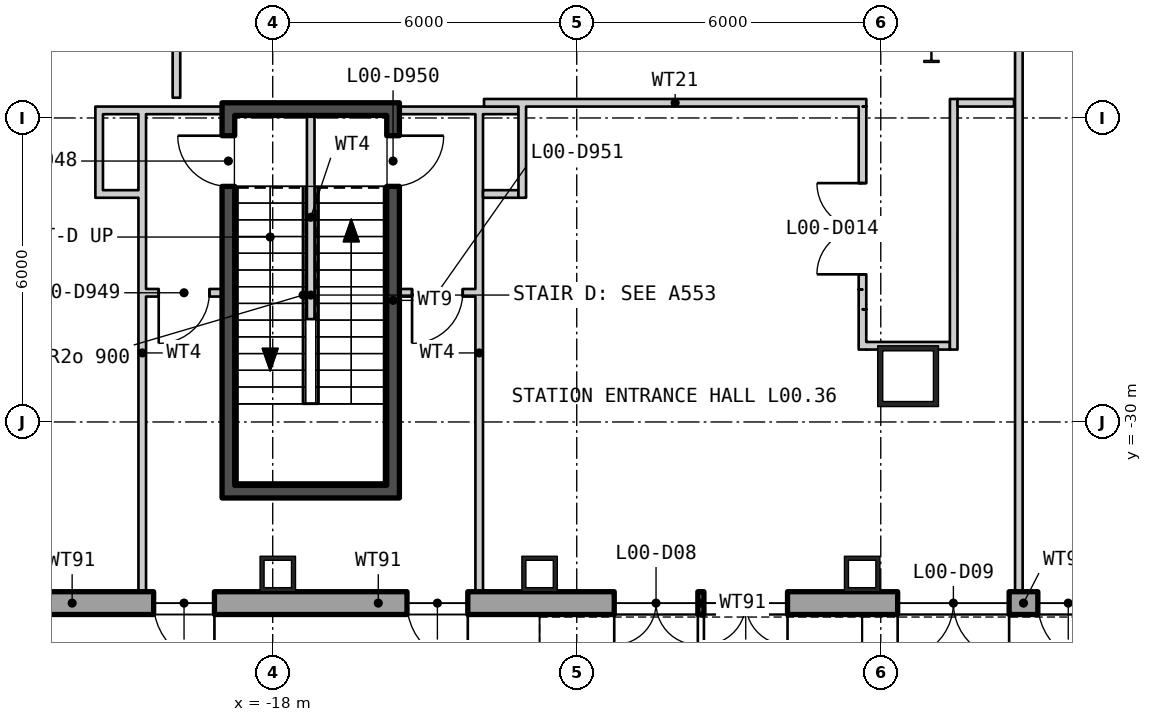
"""IFC4 building model, lengths in metres.
Left out: names, types, materials, properties, quantities, classifications, styles, units other than length and angle.
Written with IfcOpenShell. Run it as: python <this file> out.ifc"""

import sys

from ifc_helpers import new_model, si_unit, direction, frame, frame_2d, origin, origin_2d, place, context, subcontext, project, spatial, polyline, rectangle, hollow_rectangle, i_section, outline, extrude, element, fill, save


model = new_model("IFC4")
c1 = context("Model", 3, precision=1e-05, world=origin(), true_north=direction((0.0, 1.0)))
c2 = subcontext(c1, "Body", "Model", "MODEL_VIEW")
j1 = project(units=[si_unit("LENGTHUNIT", "METRE"), si_unit("PLANEANGLEUNIT", "RADIAN")], contexts=[c1])
p1 = place(None, origin())
s1 = spatial("IfcSite", under=j1, at=p1, CompositionType="ELEMENT")
p2 = place(p1, origin())
s2 = spatial("IfcBuilding", under=s1, at=p2, CompositionType="ELEMENT")
p3 = place(p2, origin())
s3 = spatial("IfcBuildingStorey", under=s2, at=p3, CompositionType="ELEMENT", Elevation=0.0)
p4 = place(p3, frame((-5.461, -29.096, 0.0), z_axis=(0.0, 0.0, 1.0), x_axis=(1.0, 0.0, 0.0)))
e1 = element("IfcColumn", 1, at=p4, inside=s3, PredefinedType="COLUMN", context=c2, shape_type="SweptSolid", body=[
    extrude(hollow_rectangle(XDim=1.2, YDim=1.2, WallThickness=0.1, at=origin_2d()), origin(), (0.0, 0.0, 1.0), 8.4),
])
p5 = place(p3, frame((-5.0, -22.4, 0.0), z_axis=(0.0, 0.0, 1.0), x_axis=(1.0, 0.0, 0.0)))
e2 = element("IfcColumn", 2, at=p5, inside=s3, PredefinedType="COLUMN", context=c2, shape_type="SweptSolid", body=[
    extrude(i_section(OverallWidth=0.302, OverallDepth=1.008, WebThickness=0.021, FlangeThickness=0.04, at=origin_2d()), origin(), (0.0, 0.0, 1.0), 8.4),
])
for number, where, z_axis, x_axis in (
    (3, (-17.9, -33.0, 0.0), (0.0, 0.0, 1.0), (1.0, 0.0, 0.0)),
    (4, (-12.733, -33.0, 0.0), (0.0, 0.0, 1.0), (1.0, 0.0, 0.0)),
    (5, (-6.367, -33.0, 0.0), (0.0, 0.0, 1.0), (1.0, 0.0, 0.0)),
):
    element("IfcColumn", number, at=place(p3, frame(where, z_axis=z_axis, x_axis=x_axis)), inside=s3, PredefinedType="COLUMN", context=c2, shape_type="SweptSolid", body=[
        extrude(hollow_rectangle(XDim=0.7, YDim=0.7, WallThickness=0.08, at=origin_2d()), origin(), (0.0, 0.0, 1.0), 8.4),
    ])
p6 = place(p3, frame((-38.775, -33.575, 5.4), z_axis=(0.0, 0.0, 1.0), x_axis=(1.0, 0.0, 0.0)))
e6 = element("IfcWall", 6, at=p6, inside=s3, PredefinedType="SOLIDWALL", context=c2, shape_type="SweptSolid", body=[
    extrude(outline(polyline([(-0.225, -0.225), (77.775, -0.225), (77.325, 0.225), (0.225, 0.225), (-0.225, -0.225)])), origin(), (0.0, 0.0, 1.0), 2.6),
])
p7 = place(p3, frame((-19.05, -33.575, -0.4), z_axis=(0.0, 0.0, 1.0), x_axis=(1.0, 0.0, 0.0)))
e7 = element("IfcWall", 7, at=p7, inside=s3, PredefinedType="SOLIDWALL", context=c2, shape_type="SweptSolid", body=[
    extrude(outline(polyline([(0.0, -0.225), (0.55, -0.225), (0.55, 0.225), (0.0, 0.225), (0.0, -0.225)])), origin(), (0.0, 0.0, 1.0), 5.8),
])
for number, where, z_axis, x_axis in (
    (8, (-13.333, -33.575, -0.4), (0.0, 0.0, 1.0), (1.0, 0.0, 0.0)),
    (9, (-6.967, -33.575, -0.4), (0.0, 0.0, 1.0), (1.0, 0.0, 0.0)),
):
    element("IfcWall", number, at=place(p3, frame(where, z_axis=z_axis, x_axis=x_axis)), inside=s3, PredefinedType="SOLIDWALL", context=c2, shape_type="SweptSolid", body=[
        extrude(outline(polyline([(0.0, -0.225), (1.2, -0.225), (1.2, 0.225), (0.0, 0.225), (0.0, -0.225)])), origin(), (0.0, 0.0, 1.0), 5.51),
    ])
p8 = place(p3, frame((-24.867, -33.575, -0.4), z_axis=(0.0, 0.0, 1.0), x_axis=(1.0, 0.0, 0.0)))
e10 = element("IfcWall", 10, at=p8, inside=s3, PredefinedType="SOLIDWALL", context=c2, shape_type="SweptSolid", body=[
    extrude(outline(polyline([(0.0, -0.225), (5.817, -0.225), (5.817, 0.225), (0.0, 0.225), (0.0, -0.225)])), origin(), (0.0, 0.0, 1.0), 5.8),
])
p9 = place(p8, frame((4.517, 0.0, 0.4)))
e11 = element("IfcOpeningElement", 11, at=p9, cuts=e10, PredefinedType="OPENING", context=c2, shape_type="SweptSolid", body=[
    extrude(rectangle(XDim=1.2, YDim=2.4, at=frame_2d((0.6, 1.2))), frame((0.0, 0.235, 0.0), z_axis=(0.0, -1.0, 0.0), x_axis=(1.0, 0.0, 0.0)), (0.0, 0.0, 1.0), 0.47),
])
p10 = place(p3, frame((-18.5, -33.575, -0.4), z_axis=(0.0, 0.0, 1.0), x_axis=(1.0, 0.0, 0.0)))
e12 = element("IfcWall", 12, at=p10, inside=s3, PredefinedType="SOLIDWALL", context=c2, shape_type="SweptSolid", body=[
    extrude(outline(polyline([(0.0, -0.225), (5.167, -0.225), (5.167, 0.225), (0.0, 0.225), (0.0, -0.225)])), origin(), (0.0, 0.0, 1.0), 5.8),
])
p11 = place(p10, frame((3.15, 0.0, 0.4)))
e13 = element("IfcOpeningElement", 13, at=p11, cuts=e12, PredefinedType="OPENING", context=c2, shape_type="SweptSolid", body=[
    extrude(rectangle(XDim=1.2, YDim=2.4, at=frame_2d((0.6, 1.2))), frame((0.0, 0.235, 0.0), z_axis=(0.0, -1.0, 0.0), x_axis=(1.0, 0.0, 0.0)), (0.0, 0.0, 1.0), 0.47),
])
p12 = place(p3, frame((-12.133, -33.575, -0.4), z_axis=(0.0, 0.0, 1.0), x_axis=(1.0, 0.0, 0.0)))
e14 = element("IfcWall", 14, at=p12, inside=s3, PredefinedType="SOLIDWALL", context=c2, shape_type="SweptSolid", body=[
    extrude(outline(polyline([(0.0, -0.225), (5.167, -0.225), (5.167, 0.225), (0.0, 0.225), (0.0, -0.225)])), origin(), (0.0, 0.0, 1.0), 5.8),
])
p13 = place(p12, frame((0.873, 0.0, 0.4)))
e15 = element("IfcOpeningElement", 15, at=p13, cuts=e14, PredefinedType="OPENING", context=c2, shape_type="SweptSolid", body=[
    extrude(rectangle(XDim=1.65, YDim=3.0, at=frame_2d((0.825, 1.5))), frame((0.0, 0.235, 0.0), z_axis=(0.0, -1.0, 0.0), x_axis=(1.0, 0.0, 0.0)), (0.0, 0.0, 1.0), 0.47),
])
p14 = place(p12, frame((2.643, 0.0, 0.4)))
e16 = element("IfcOpeningElement", 16, at=p14, cuts=e14, PredefinedType="OPENING", context=c2, shape_type="SweptSolid", body=[
    extrude(rectangle(XDim=1.65, YDim=3.0, at=frame_2d((0.825, 1.5))), frame((0.0, 0.235, 0.0), z_axis=(0.0, -1.0, 0.0), x_axis=(1.0, 0.0, 0.0)), (0.0, 0.0, 1.0), 0.47),
])
p15 = place(p3, frame((-5.767, -33.575, -0.4), z_axis=(0.0, 0.0, 1.0), x_axis=(1.0, 0.0, 0.0)))
e17 = element("IfcWall", 17, at=p15, inside=s3, PredefinedType="SOLIDWALL", context=c2, shape_type="SweptSolid", body=[
    extrude(outline(polyline([(0.0, -0.225), (5.167, -0.225), (5.167, 0.225), (0.0, 0.225), (0.0, -0.225)])), origin(), (0.0, 0.0, 1.0), 5.8),
])
p16 = place(p15, frame((2.867, 0.0, 0.4)))
e18 = element("IfcOpeningElement", 18, at=p16, cuts=e17, PredefinedType="OPENING", context=c2, shape_type="SweptSolid", body=[
    extrude(rectangle(XDim=1.2, YDim=2.4, at=frame_2d((0.6, 1.2))), frame((0.0, 0.235, 0.0), z_axis=(0.0, -1.0, 0.0), x_axis=(1.0, 0.0, 0.0)), (0.0, 0.0, 1.0), 0.47),
])
p17 = place(p15, frame((0.1, 0.0, 0.4)))
e19 = element("IfcOpeningElement", 19, at=p17, cuts=e17, PredefinedType="OPENING", context=c2, shape_type="SweptSolid", body=[
    extrude(rectangle(XDim=2.2, YDim=3.0, at=frame_2d((1.1, 1.5))), frame((0.0, 0.235, 0.0), z_axis=(0.0, -1.0, 0.0), x_axis=(1.0, 0.0, 0.0)), (0.0, 0.0, 1.0), 0.47),
])
p18 = place(p3, frame((-3.275, -33.35, 0.0), z_axis=(0.0, 0.0, 1.0), x_axis=(0.0, 1.0, 0.0)))
e20 = element("IfcWall", 20, at=p18, inside=s3, PredefinedType="PARTITIONING", context=c2, shape_type="SweptSolid", body=[
    extrude(rectangle(XDim=0.45, YDim=0.15, at=frame_2d((0.225, 0.0))), origin(), (0.0, 0.0, 1.0), 8.18),
])
p19 = place(p3, frame((-3.275, -32.9, 0.0), z_axis=(0.0, 0.0, 1.0), x_axis=(0.0, 1.0, 0.0)))
e21 = element("IfcWall", 21, at=p19, inside=s3, PredefinedType="PARTITIONING", context=c2, shape_type="SweptSolid", body=[
    extrude(rectangle(XDim=16.6, YDim=0.15, at=frame_2d((8.3, 0.0))), origin(), (0.0, 0.0, 1.0), 7.58),
])
p20 = place(p3, frame((-18.875, -31.25, 0.0), z_axis=(0.0, 0.0, 1.0), x_axis=(0.0, 1.0, 0.0)))
e22 = element("IfcWall", 22, at=p20, inside=s3, PredefinedType="SHEAR", context=c2, shape_type="SweptSolid", body=[
    extrude(rectangle(XDim=7.3, YDim=0.25, at=frame_2d((3.65, 0.0))), origin(), (0.0, 0.0, 1.0), 8.18),
])
p21 = place(p20, frame((5.9, 0.0, 0.0)))
e23 = element("IfcOpeningElement", 23, at=p21, cuts=e22, PredefinedType="OPENING", context=c2, shape_type="SweptSolid", body=[
    extrude(rectangle(XDim=1.0, YDim=2.1, at=frame_2d((0.5, 1.05))), frame((0.0, 0.135, 0.0), z_axis=(0.0, -1.0, 0.0), x_axis=(1.0, 0.0, 0.0)), (0.0, 0.0, 1.0), 0.27),
])
p22 = place(p3, frame((-15.625, -31.25, 0.0), z_axis=(0.0, 0.0, 1.0), x_axis=(0.0, 1.0, 0.0)))
e24 = element("IfcWall", 24, at=p22, inside=s3, PredefinedType="SHEAR", context=c2, shape_type="SweptSolid", body=[
    extrude(rectangle(XDim=7.3, YDim=0.25, at=frame_2d((3.65, 0.0))), origin(), (0.0, 0.0, 1.0), 8.18),
])
p23 = place(p22, frame((5.9, 0.0, 0.0)))
e25 = element("IfcOpeningElement", 25, at=p23, cuts=e24, PredefinedType="OPENING", context=c2, shape_type="SweptSolid", body=[
    extrude(rectangle(XDim=1.0, YDim=2.1, at=frame_2d((0.5, 1.05))), frame((0.0, 0.135, 0.0), z_axis=(0.0, -1.0, 0.0), x_axis=(1.0, 0.0, 0.0)), (0.0, 0.0, 1.0), 0.27),
])
for number, where, z_axis, x_axis in (
    (26, (-19.0, -31.375, 0.0), (0.0, 0.0, 1.0), (1.0, 0.0, 0.0)),
    (27, (-19.0, -23.825, 0.0), (0.0, 0.0, 1.0), (1.0, 0.0, 0.0)),
):
    element("IfcWall", number, at=place(p3, frame(where, z_axis=z_axis, x_axis=x_axis)), inside=s3, PredefinedType="SHEAR", context=c2, shape_type="SweptSolid", body=[
        extrude(rectangle(XDim=3.5, YDim=0.25, at=frame_2d((1.75, 0.0))), origin(), (0.0, 0.0, 1.0), 8.18),
    ])
p24 = place(p3, frame((-17.25, -27.97, 0.0), z_axis=(0.0, 0.0, 1.0), x_axis=(0.0, 1.0, 0.0)))
e28 = element("IfcWall", 28, at=p24, inside=s3, PredefinedType="PARTITIONING", context=c2, shape_type="SweptSolid", body=[
    extrude(rectangle(XDim=4.02, YDim=0.15, at=frame_2d((2.01, 0.0))), origin(), (0.0, 0.0, 1.0), 4.0),
])
p25 = place(p3, frame((-20.575, -33.35, 0.0), z_axis=(0.0, 0.0, 1.0), x_axis=(0.0, 1.0, 0.0)))
e29 = element("IfcWall", 29, at=p25, inside=s3, PredefinedType="PARTITIONING", context=c2, shape_type="SweptSolid", body=[
    extrude(rectangle(XDim=9.425, YDim=0.15, at=frame_2d((4.713, 0.0))), origin(), (0.0, 0.0, 1.0), 8.18),
])
p26 = place(p3, frame((-19.0, -23.85, 0.0), z_axis=(0.0, 0.0, 1.0), x_axis=(-1.0, 0.0, 0.0)))
e30 = element("IfcWall", 30, at=p26, inside=s3, PredefinedType="PARTITIONING", context=c2, shape_type="SweptSolid", body=[
    extrude(rectangle(XDim=2.35, YDim=0.15, at=frame_2d((1.175, 0.0))), origin(), (0.0, 0.0, 1.0), 8.18),
])
p27 = place(p3, frame((-20.5, -27.45, 0.0), z_axis=(0.0, 0.0, 1.0), x_axis=(1.0, 0.0, 0.0)))
e31 = element("IfcWall", 31, at=p27, inside=s3, PredefinedType="PARTITIONING", context=c2, shape_type="SweptSolid", body=[
    extrude(rectangle(XDim=1.5, YDim=0.15, at=frame_2d((0.75, 0.0))), origin(), (0.0, 0.0, 1.0), 8.18),
])
p28 = place(p27, frame((0.25, 0.0, 0.0)))
e32 = element("IfcOpeningElement", 32, at=p28, cuts=e31, PredefinedType="OPENING", context=c2, shape_type="SweptSolid", body=[
    extrude(rectangle(XDim=1.0, YDim=2.1, at=frame_2d((0.5, 1.05))), frame((0.0, 0.085, 0.0), z_axis=(0.0, -1.0, 0.0), x_axis=(1.0, 0.0, 0.0)), (0.0, 0.0, 1.0), 0.17),
])
p29 = place(p3, frame((-21.425, -25.575, 0.0), z_axis=(0.0, 0.0, 1.0), x_axis=(0.0, 1.0, 0.0)))
e33 = element("IfcWall", 33, at=p29, inside=s3, PredefinedType="PARTITIONING", context=c2, shape_type="SweptSolid", body=[
    extrude(rectangle(XDim=1.8, YDim=0.15, at=frame_2d((0.9, 0.0))), origin(), (0.0, 0.0, 1.0), 8.18),
])
p30 = place(p3, frame((-20.65, -25.5, 0.0), z_axis=(0.0, 0.0, 1.0), x_axis=(-1.0, 0.0, 0.0)))
e34 = element("IfcWall", 34, at=p30, inside=s3, PredefinedType="PARTITIONING", context=c2, shape_type="SweptSolid", body=[
    extrude(rectangle(XDim=0.7, YDim=0.15, at=frame_2d((0.35, 0.0))), origin(), (0.0, 0.0, 1.0), 8.18),
])
p31 = place(p3, frame((-13.925, -33.35, 0.0), z_axis=(0.0, 0.0, 1.0), x_axis=(0.0, 1.0, 0.0)))
e35 = element("IfcWall", 35, at=p31, inside=s3, PredefinedType="PARTITIONING", context=c2, shape_type="SweptSolid", body=[
    extrude(rectangle(XDim=9.425, YDim=0.15, at=frame_2d((4.713, 0.0))), origin(), (0.0, 0.0, 1.0), 8.18),
])
p32 = place(p3, frame((-15.5, -23.85, 0.0), z_axis=(0.0, 0.0, 1.0), x_axis=(1.0, 0.0, 0.0)))
e36 = element("IfcWall", 36, at=p32, inside=s3, PredefinedType="PARTITIONING", context=c2, shape_type="SweptSolid", body=[
    extrude(rectangle(XDim=2.35, YDim=0.15, at=frame_2d((1.175, 0.0))), origin(), (0.0, 0.0, 1.0), 8.18),
])
p33 = place(p3, frame((-15.5, -27.45, 0.0), z_axis=(0.0, 0.0, 1.0), x_axis=(1.0, 0.0, 0.0)))
e37 = element("IfcWall", 37, at=p33, inside=s3, PredefinedType="PARTITIONING", context=c2, shape_type="SweptSolid", body=[
    extrude(rectangle(XDim=1.5, YDim=0.15, at=frame_2d((0.75, 0.0))), origin(), (0.0, 0.0, 1.0), 8.18),
])
p34 = place(p33, frame((0.25, 0.0, 0.0)))
e38 = element("IfcOpeningElement", 38, at=p34, cuts=e37, PredefinedType="OPENING", context=c2, shape_type="SweptSolid", body=[
    extrude(rectangle(XDim=1.0, YDim=2.1, at=frame_2d((0.5, 1.05))), frame((0.0, 0.085, 0.0), z_axis=(0.0, -1.0, 0.0), x_axis=(1.0, 0.0, 0.0)), (0.0, 0.0, 1.0), 0.17),
])
p35 = place(p3, frame((-13.075, -25.575, 0.0), z_axis=(0.0, 0.0, 1.0), x_axis=(0.0, 1.0, 0.0)))
e39 = element("IfcWall", 39, at=p35, inside=s3, PredefinedType="PARTITIONING", context=c2, shape_type="SweptSolid", body=[
    extrude(rectangle(XDim=1.8, YDim=0.15, at=frame_2d((0.9, 0.0))), origin(), (0.0, 0.0, 1.0), 8.18),
])
p36 = place(p3, frame((-13.85, -25.5, 0.0), z_axis=(0.0, 0.0, 1.0), x_axis=(1.0, 0.0, 0.0)))
e40 = element("IfcWall", 40, at=p36, inside=s3, PredefinedType="PARTITIONING", context=c2, shape_type="SweptSolid", body=[
    extrude(rectangle(XDim=0.7, YDim=0.15, at=frame_2d((0.35, 0.0))), origin(), (0.0, 0.0, 1.0), 8.18),
])
p37 = place(p3, frame((-19.9, -23.6, 0.0), z_axis=(0.0, 0.0, 1.0), x_axis=(0.0, 1.0, 0.0)))
e41 = element("IfcWall", 41, at=p37, inside=s3, PredefinedType="PARTITIONING", context=c2, shape_type="SweptSolid", body=[
    extrude(rectangle(XDim=8.902, YDim=0.15, at=frame_2d((4.451, 0.0))), origin(), (0.0, 0.0, 1.0), 8.18),
])
p38 = place(p37, frame((3.424, 0.0, 0.0)))
e42 = element("IfcOpeningElement", 42, at=p38, cuts=e41, PredefinedType="OPENING", context=c2, shape_type="SweptSolid", body=[
    extrude(rectangle(XDim=1.8, YDim=2.1, at=frame_2d((0.9, 1.05))), frame((0.0, 0.085, 0.0), z_axis=(0.0, -1.0, 0.0), x_axis=(1.0, 0.0, 0.0)), (0.0, 0.0, 1.0), 0.17),
])
p39 = place(p3, frame((-13.83, -23.7, 0.0), z_axis=(0.0, 0.0, 1.0), x_axis=(1.0, 0.0, 0.0)))
e43 = element("IfcWall", 43, at=p39, inside=s3, PredefinedType="PARTITIONING", context=c2, shape_type="SweptSolid", body=[
    extrude(rectangle(XDim=7.545, YDim=0.15, at=frame_2d((3.772, 0.0))), origin(), (0.0, 0.0, 1.0), 8.18),
])
p40 = place(p3, frame((-6.361, -28.571, 0.0), z_axis=(0.0, 0.0, 1.0), x_axis=(0.000251572319, 0.999999968356, 0.0)))
e44 = element("IfcWall", 44, at=p40, inside=s3, PredefinedType="PARTITIONING", context=c2, shape_type="SweptSolid", body=[
    extrude(rectangle(XDim=0.795, YDim=0.15, at=frame_2d((0.398, 0.0))), origin(), (0.0, 0.0, 1.0), 7.58),
])
p41 = place(p3, frame((-6.361, -27.776, 0.0), z_axis=(0.0, 0.0, 1.0), x_axis=(0.0, 1.0, 0.0)))
e45 = element("IfcWall", 45, at=p41, inside=s3, PredefinedType="PARTITIONING", context=c2, shape_type="SweptSolid", body=[
    extrude(rectangle(XDim=0.39, YDim=0.15, at=frame_2d((0.195, 0.0))), origin(), (0.0, 0.0, 1.0), 8.18),
])
p42 = place(p3, frame((-6.361, -27.386, 0.0), z_axis=(0.0, 0.0, 1.0), x_axis=(0.000221545273, 0.999999975459, 0.0)))
e46 = element("IfcWall", 46, at=p42, inside=s3, PredefinedType="PARTITIONING", context=c2, shape_type="SweptSolid", body=[
    extrude(rectangle(XDim=3.611, YDim=0.15, at=frame_2d((1.806, 0.0))), origin(), (0.0, 0.0, 1.0), 7.58),
])
p43 = place(p42, frame((0.3, 0.0, 0.0)))
e47 = element("IfcOpeningElement", 47, at=p43, cuts=e46, PredefinedType="OPENING", context=c2, shape_type="SweptSolid", body=[
    extrude(rectangle(XDim=1.8, YDim=2.1, at=frame_2d((0.9, 1.05))), frame((0.0, 0.085, 0.0), z_axis=(0.0, -1.0, 0.0), x_axis=(1.0, 0.0, 0.0)), (0.0, 0.0, 1.0), 0.17),
])
p44 = place(p3, frame((-6.286, -28.496, 0.0), z_axis=(0.0, 0.0, 1.0), x_axis=(1.0, 0.0, 0.0)))
e48 = element("IfcWall", 48, at=p44, inside=s3, PredefinedType="PARTITIONING", context=c2, shape_type="SweptSolid", body=[
    extrude(rectangle(XDim=1.65, YDim=0.15, at=frame_2d((0.825, 0.0))), origin(), (0.0, 0.0, 1.0), 8.18),
])
p45 = place(p3, frame((-4.561, -28.571, 0.0), z_axis=(0.0, 0.0, 1.0), x_axis=(0.000202183579, 0.999999979561, 0.0)))
e49 = element("IfcWall", 49, at=p45, inside=s3, PredefinedType="PARTITIONING", context=c2, shape_type="SweptSolid", body=[
    extrude(rectangle(XDim=4.946, YDim=0.15, at=frame_2d((2.473, 0.0))), origin(), (0.0, 0.0, 1.0), 8.18),
])
p46 = place(p3, frame((-4.485, -23.7, 0.0), z_axis=(0.0, 0.0, 1.0), x_axis=(1.0, 0.0, 0.0)))
e50 = element("IfcWall", 50, at=p46, inside=s3, PredefinedType="PARTITIONING", context=c2, shape_type="SweptSolid", body=[
    extrude(rectangle(XDim=1.115, YDim=0.15, at=frame_2d((0.557, 0.0))), origin(), (0.0, 0.0, 1.0), 8.18),
])
p47 = place(p9, frame((1.2, 0.0, 0.0), z_axis=(0.0, 0.0, 1.0), x_axis=(-1.0, 0.0, 0.0)))
e51 = element("IfcDoor", 51, at=p47, inside=s3, OperationType="SINGLE_SWING_RIGHT", PredefinedType="DOOR", context=c2, shape_type="SweptSolid", body=[
    extrude(rectangle(XDim=1.2, YDim=2.4, at=frame_2d((0.6, 1.2))), frame((0.0, 0.025, 0.0), z_axis=(0.0, -1.0, 0.0), x_axis=(1.0, 0.0, 0.0)), (0.0, 0.0, 1.0), 0.05),
])
fill(e11, e51)
p48 = place(p11, frame((1.2, 0.0, 0.0), z_axis=(0.0, 0.0, 1.0), x_axis=(-1.0, 0.0, 0.0)))
e52 = element("IfcDoor", 52, at=p48, inside=s3, OperationType="SINGLE_SWING_RIGHT", PredefinedType="DOOR", context=c2, shape_type="SweptSolid", body=[
    extrude(rectangle(XDim=1.2, YDim=2.4, at=frame_2d((0.6, 1.2))), frame((0.0, 0.025, 0.0), z_axis=(0.0, -1.0, 0.0), x_axis=(1.0, 0.0, 0.0)), (0.0, 0.0, 1.0), 0.05),
])
fill(e13, e52)
p49 = place(p13, frame((1.65, 0.0, 0.0), z_axis=(0.0, 0.0, 1.0), x_axis=(-1.0, 0.0, 0.0)))
e53 = element("IfcDoor", 53, at=p49, inside=s3, OperationType="DOUBLE_DOOR_DOUBLE_SWING", PredefinedType="DOOR", context=c2, shape_type="SweptSolid", body=[
    extrude(rectangle(XDim=1.65, YDim=3.0, at=frame_2d((0.825, 1.5))), frame((0.0, 0.025, 0.0), z_axis=(0.0, -1.0, 0.0), x_axis=(1.0, 0.0, 0.0)), (0.0, 0.0, 1.0), 0.05),
])
fill(e15, e53)
p50 = place(p14, frame((1.65, 0.0, 0.0), z_axis=(0.0, 0.0, 1.0), x_axis=(-1.0, 0.0, 0.0)))
e54 = element("IfcDoor", 54, at=p50, inside=s3, OperationType="DOUBLE_DOOR_DOUBLE_SWING", PredefinedType="DOOR", context=c2, shape_type="SweptSolid", body=[
    extrude(rectangle(XDim=1.65, YDim=3.0, at=frame_2d((0.825, 1.5))), frame((0.0, 0.025, 0.0), z_axis=(0.0, -1.0, 0.0), x_axis=(1.0, 0.0, 0.0)), (0.0, 0.0, 1.0), 0.05),
])
fill(e16, e54)
p51 = place(p16, frame((1.2, 0.0, 0.0), z_axis=(0.0, 0.0, 1.0), x_axis=(-1.0, 0.0, 0.0)))
e55 = element("IfcDoor", 55, at=p51, inside=s3, OperationType="SINGLE_SWING_RIGHT", PredefinedType="DOOR", context=c2, shape_type="SweptSolid", body=[
    extrude(rectangle(XDim=1.2, YDim=2.4, at=frame_2d((0.6, 1.2))), frame((0.0, 0.025, 0.0), z_axis=(0.0, -1.0, 0.0), x_axis=(1.0, 0.0, 0.0)), (0.0, 0.0, 1.0), 0.05),
])
fill(e18, e55)
p52 = place(p17, frame((2.2, 0.0, 0.0), z_axis=(0.0, 0.0, 1.0), x_axis=(-1.0, 0.0, 0.0)))
e56 = element("IfcDoor", 56, at=p52, inside=s3, OperationType="DOUBLE_DOOR_DOUBLE_SWING", PredefinedType="DOOR", context=c2, shape_type="SweptSolid", body=[
    extrude(rectangle(XDim=2.2, YDim=3.0, at=frame_2d((1.1, 1.5))), frame((0.0, 0.025, 0.0), z_axis=(0.0, -1.0, 0.0), x_axis=(1.0, 0.0, 0.0)), (0.0, 0.0, 1.0), 0.05),
])
fill(e19, e56)
p53 = place(p21, origin())
e57 = element("IfcDoor", 57, at=p53, inside=s3, OperationType="SINGLE_SWING_LEFT", PredefinedType="DOOR", context=c2, shape_type="SweptSolid", body=[
    extrude(rectangle(XDim=1.0, YDim=2.1, at=frame_2d((0.5, 1.05))), frame((0.0, 0.025, 0.0), z_axis=(0.0, -1.0, 0.0), x_axis=(1.0, 0.0, 0.0)), (0.0, 0.0, 1.0), 0.05),
])
fill(e23, e57)
p54 = place(p28, origin())
e58 = element("IfcDoor", 58, at=p54, inside=s3, OperationType="SINGLE_SWING_LEFT", PredefinedType="DOOR", context=c2, shape_type="SweptSolid", body=[
    extrude(rectangle(XDim=1.0, YDim=2.1, at=frame_2d((0.5, 1.05))), frame((0.0, 0.025, 0.0), z_axis=(0.0, -1.0, 0.0), x_axis=(1.0, 0.0, 0.0)), (0.0, 0.0, 1.0), 0.05),
])
fill(e32, e58)
p55 = place(p23, origin())
e59 = element("IfcDoor", 59, at=p55, inside=s3, OperationType="SINGLE_SWING_RIGHT", PredefinedType="DOOR", context=c2, shape_type="SweptSolid", body=[
    extrude(rectangle(XDim=1.0, YDim=2.1, at=frame_2d((0.5, 1.05))), frame((0.0, 0.025, 0.0), z_axis=(0.0, -1.0, 0.0), x_axis=(1.0, 0.0, 0.0)), (0.0, 0.0, 1.0), 0.05),
])
fill(e25, e59)
p56 = place(p34, origin())
e60 = element("IfcDoor", 60, at=p56, inside=s3, OperationType="SINGLE_SWING_LEFT", PredefinedType="DOOR", context=c2, shape_type="SweptSolid", body=[
    extrude(rectangle(XDim=1.0, YDim=2.1, at=frame_2d((0.5, 1.05))), frame((0.0, 0.025, 0.0), z_axis=(0.0, -1.0, 0.0), x_axis=(1.0, 0.0, 0.0)), (0.0, 0.0, 1.0), 0.05),
])
fill(e38, e60)
p57 = place(p43, origin())
e61 = element("IfcDoor", 61, at=p57, inside=s3, OperationType="DOUBLE_DOOR_SINGLE_SWING", PredefinedType="DOOR", context=c2, shape_type="SweptSolid", body=[
    extrude(rectangle(XDim=1.8, YDim=2.1, at=frame_2d((0.9, 1.05))), frame((0.0, 0.025, 0.0), z_axis=(0.0, -1.0, 0.0), x_axis=(1.0, 0.0, 0.0)), (0.0, 0.0, 1.0), 0.05),
])
fill(e47, e61)
save(model, sys.argv[1])
